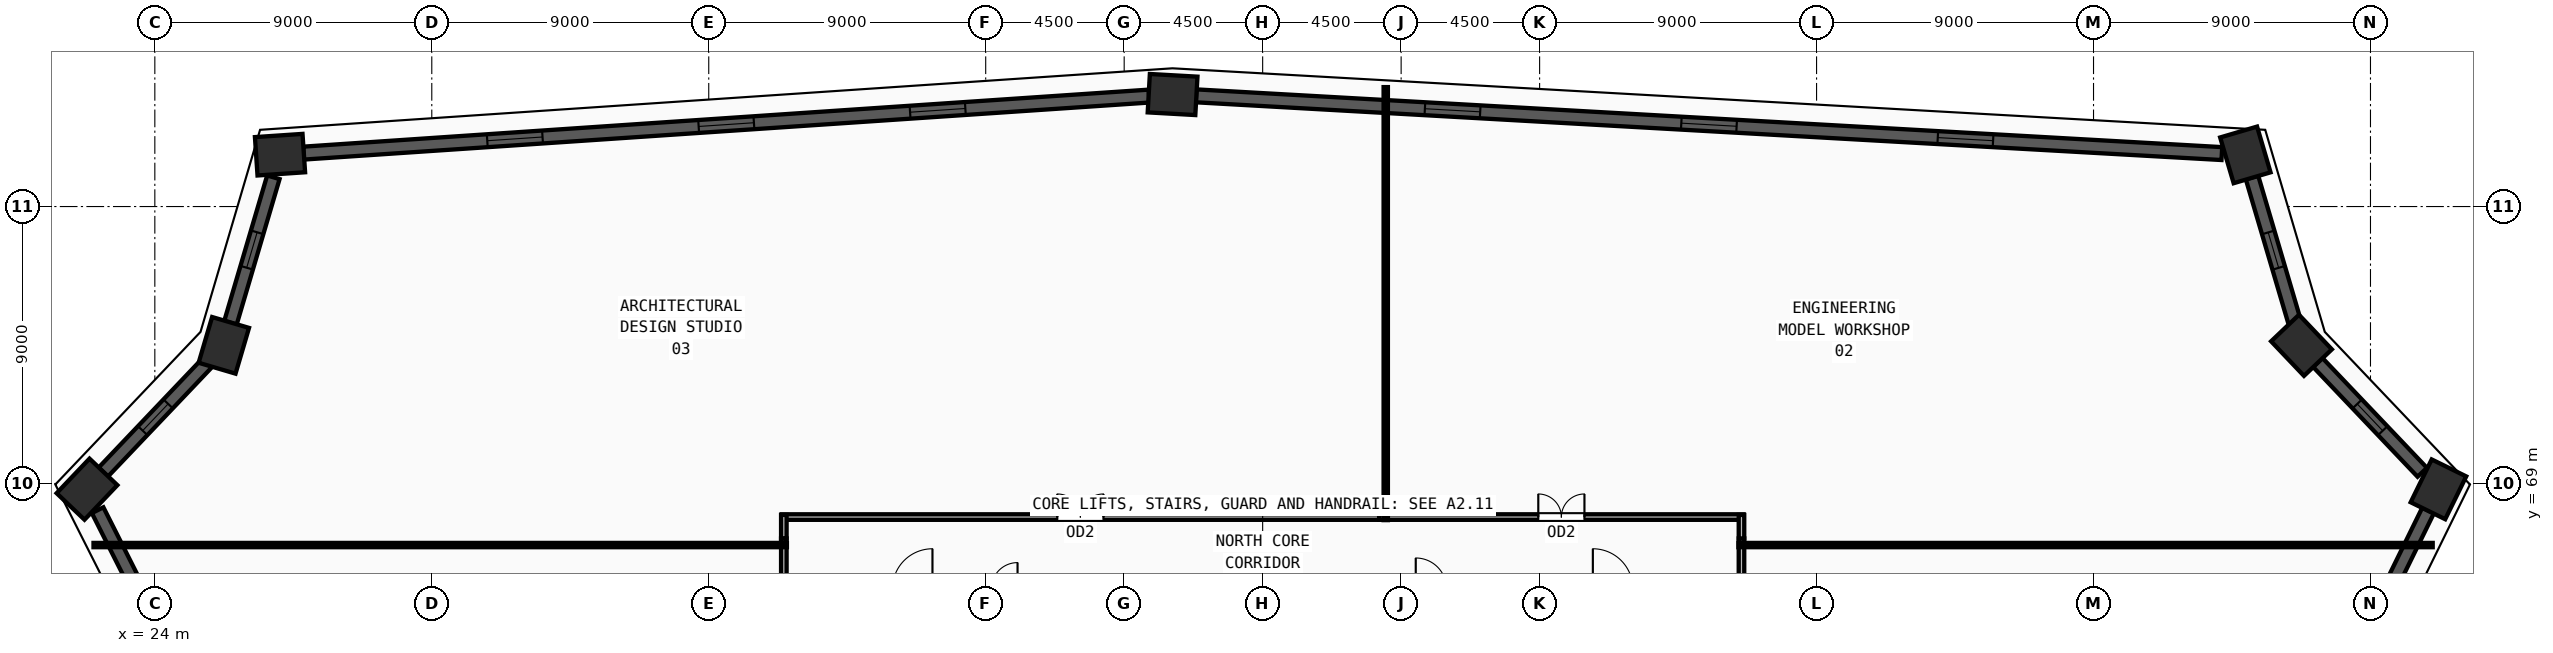
"""IFC4 building model, lengths in metres.
Left out: names, types, materials, properties, quantities, classifications, styles, units other than length and angle.
Written with IfcOpenShell. Run it as: python <this file> out.ifc"""

import sys

from ifc_helpers import new_model, si_unit, direction, frame, frame_2d, origin, origin_2d, place, context, subcontext, project, spatial, rectangle, extrude, source, transform, mapped, element, fill, save


model = new_model("IFC4")
c1 = context("Model", 3, precision=1e-05, world=origin(), true_north=direction((0.0, 1.0)))
c2 = subcontext(c1, "Body", "Model", "MODEL_VIEW")
j1 = project(units=[si_unit("LENGTHUNIT", "METRE"), si_unit("PLANEANGLEUNIT", "RADIAN")], contexts=[c1])
p1 = place(None, origin())
s1 = spatial("IfcSite", under=j1, at=p1, CompositionType="ELEMENT")
p2 = place(p1, origin())
s2 = spatial("IfcBuilding", under=s1, at=p2, CompositionType="ELEMENT")
p3 = place(p2, frame((0.0, 0.0, 63.0)))
s3 = spatial("IfcBuildingStorey", under=s2, at=p3, CompositionType="ELEMENT", Elevation=63.0)
m1 = source(origin(), c2, "Body", "SweptSolid", [
    extrude(rectangle(XDim=1.55, YDim=1.25, at=origin_2d()), origin(), (0.0, 0.0, 1.0), 3.75),
])
for number, where, z_axis, x_axis in (
    (1, (21.796, 68.816, 0.0), (0.0, 0.0, 1.0), (0.689, 0.725, 0.0)),
    (2, (26.242, 73.49, 0.0), (0.0, 0.0, 1.0), (0.283, 0.959, 0.0)),
    (3, (28.068, 79.685, 0.0), (0.0, 0.0, 1.0), (0.998, 0.067, 0.0)),
    (4, (57.073, 81.64, 0.0), (0.0, 0.0, 1.0), (-0.998, 0.056, 0.0)),
    (5, (91.934, 79.678, 0.0), (0.0, 0.0, 1.0), (-0.283, 0.959, 0.0)),
    (6, (93.758, 73.49, 0.0), (0.0, 0.0, 1.0), (-0.689, 0.725, 0.0)),
    (7, (98.209, 68.811, 0.0), (0.0, 0.0, 1.0), (0.441, 0.898, 0.0)),
):
    element("IfcColumn", number, at=place(p3, frame(where, z_axis=z_axis, x_axis=x_axis)), inside=s3, PredefinedType="COLUMN", context=c2, shape_type="MappedRepresentation", body=[
        mapped(m1, transform((0.0, 0.0, 0.0), x_axis=(1.0, 0.0, 0.0), y_axis=(0.0, 1.0, 0.0), z_axis=(0.0, 0.0, 1.0), scale=1.0)),
    ])
p4 = place(p3, frame((85.738, 43.403, 0.0), z_axis=(0.0, 0.0, 1.0), x_axis=(0.440623312768, 0.897692094343, 0.0)))
e8 = element("IfcWall", 8, at=p4, inside=s3, PredefinedType="SOLIDWALL", context=c2, shape_type="SweptSolid", body=[
    extrude(rectangle(XDim=27.538, YDim=0.42, at=frame_2d((13.769, 0.0))), origin(), (0.0, 0.0, 1.0), 3.57),
])
m2 = source(origin(), c2, "Body", "SweptSolid", [
    extrude(rectangle(XDim=1.8, YDim=1.95, at=frame_2d((0.9, 0.975))), frame((0.0, 0.22, 0.0), z_axis=(0.0, -1.0, 0.0), x_axis=(1.0, 0.0, 0.0)), (0.0, 0.0, 1.0), 0.44),
])
p5 = place(p4, frame((5.985, 0.0, 0.55)))
e9 = element("IfcOpeningElement", 9, at=p5, cuts=e8, PredefinedType="OPENING", context=c2, shape_type="MappedRepresentation", body=[
    mapped(m2, transform((0.0, 0.0, 0.0), x_axis=(1.0, 0.0, 0.0), y_axis=(0.0, 1.0, 0.0), z_axis=(0.0, 0.0, 1.0), scale=1.0)),
])
p6 = place(p4, frame((12.869, 0.0, 0.55)))
e10 = element("IfcOpeningElement", 10, at=p6, cuts=e8, PredefinedType="OPENING", context=c2, shape_type="MappedRepresentation", body=[
    mapped(m2, transform((0.0, 0.0, 0.0), x_axis=(1.0, 0.0, 0.0), y_axis=(0.0, 1.0, 0.0), z_axis=(0.0, 0.0, 1.0), scale=1.0)),
])
p7 = place(p4, frame((19.754, 0.0, 0.55)))
e11 = element("IfcOpeningElement", 11, at=p7, cuts=e8, PredefinedType="OPENING", context=c2, shape_type="MappedRepresentation", body=[
    mapped(m2, transform((0.0, 0.0, 0.0), x_axis=(1.0, 0.0, 0.0), y_axis=(0.0, 1.0, 0.0), z_axis=(0.0, 0.0, 1.0), scale=1.0)),
])
p8 = place(p3, frame((97.682, 69.365, 0.0), z_axis=(0.0, 0.0, 1.0), x_axis=(-0.689227085511, 0.724545391675, 0.0)))
e12 = element("IfcWall", 12, at=p8, inside=s3, PredefinedType="SOLIDWALL", context=c2, shape_type="SweptSolid", body=[
    extrude(rectangle(XDim=4.929, YDim=0.42, at=frame_2d((2.464, 0.0))), origin(), (0.0, 0.0, 1.0), 3.57),
])
m3 = source(origin(), c2, "Body", "SweptSolid", [
    extrude(rectangle(XDim=1.2, YDim=1.9, at=frame_2d((0.6, 0.95))), frame((0.0, 0.22, 0.0), z_axis=(0.0, -1.0, 0.0), x_axis=(1.0, 0.0, 0.0)), (0.0, 0.0, 1.0), 0.44),
])
p9 = place(p8, frame((1.864, 0.0, 0.55)))
e13 = element("IfcOpeningElement", 13, at=p9, cuts=e12, PredefinedType="OPENING", context=c2, shape_type="MappedRepresentation", body=[
    mapped(m3, transform((0.0, 0.0, 0.0), x_axis=(1.0, 0.0, 0.0), y_axis=(0.0, 1.0, 0.0), z_axis=(0.0, 0.0, 1.0), scale=1.0)),
])
p10 = place(p3, frame((93.542, 74.224, 0.0), z_axis=(0.0, 0.0, 1.0), x_axis=(-0.282888780921, 0.959152718616, 0.0)))
e14 = element("IfcWall", 14, at=p10, inside=s3, PredefinedType="SOLIDWALL", context=c2, shape_type="SweptSolid", body=[
    extrude(rectangle(XDim=4.921, YDim=0.42, at=frame_2d((2.46, 0.0))), origin(), (0.0, 0.0, 1.0), 3.57),
])
p11 = place(p10, frame((1.86, 0.0, 0.55)))
e15 = element("IfcOpeningElement", 15, at=p11, cuts=e14, PredefinedType="OPENING", context=c2, shape_type="MappedRepresentation", body=[
    mapped(m3, transform((0.0, 0.0, 0.0), x_axis=(1.0, 0.0, 0.0), y_axis=(0.0, 1.0, 0.0), z_axis=(0.0, 0.0, 1.0), scale=1.0)),
])
p12 = place(p3, frame((91.17, 79.721, 0.0), z_axis=(0.0, 0.0, 1.0), x_axis=(-0.998420041746, 0.056190926675, 0.0)))
e16 = element("IfcWall", 16, at=p12, inside=s3, PredefinedType="SOLIDWALL", context=c2, shape_type="SweptSolid", body=[
    extrude(rectangle(XDim=33.386, YDim=0.42, at=frame_2d((16.693, 0.0))), origin(), (0.0, 0.0, 1.0), 3.57),
])
p13 = place(p12, frame((7.446, 0.0, 0.55)))
e17 = element("IfcOpeningElement", 17, at=p13, cuts=e16, PredefinedType="OPENING", context=c2, shape_type="MappedRepresentation", body=[
    mapped(m2, transform((0.0, 0.0, 0.0), x_axis=(1.0, 0.0, 0.0), y_axis=(0.0, 1.0, 0.0), z_axis=(0.0, 0.0, 1.0), scale=1.0)),
])
p14 = place(p12, frame((15.793, 0.0, 0.55)))
e18 = element("IfcOpeningElement", 18, at=p14, cuts=e16, PredefinedType="OPENING", context=c2, shape_type="MappedRepresentation", body=[
    mapped(m2, transform((0.0, 0.0, 0.0), x_axis=(1.0, 0.0, 0.0), y_axis=(0.0, 1.0, 0.0), z_axis=(0.0, 0.0, 1.0), scale=1.0)),
])
p15 = place(p12, frame((24.139, 0.0, 0.55)))
e19 = element("IfcOpeningElement", 19, at=p15, cuts=e16, PredefinedType="OPENING", context=c2, shape_type="MappedRepresentation", body=[
    mapped(m2, transform((0.0, 0.0, 0.0), x_axis=(1.0, 0.0, 0.0), y_axis=(0.0, 1.0, 0.0), z_axis=(0.0, 0.0, 1.0), scale=1.0)),
])
p16 = place(p3, frame((56.31, 81.589, 0.0), z_axis=(0.0, 0.0, 1.0), x_axis=(-0.997734032959, -0.067281494306, 0.0)))
e20 = element("IfcWall", 20, at=p16, inside=s3, PredefinedType="SOLIDWALL", context=c2, shape_type="SweptSolid", body=[
    extrude(rectangle(XDim=27.542, YDim=0.42, at=frame_2d((13.771, 0.0))), origin(), (0.0, 0.0, 1.0), 3.57),
])
p17 = place(p16, frame((5.985, 0.0, 0.55)))
e21 = element("IfcOpeningElement", 21, at=p17, cuts=e20, PredefinedType="OPENING", context=c2, shape_type="MappedRepresentation", body=[
    mapped(m2, transform((0.0, 0.0, 0.0), x_axis=(1.0, 0.0, 0.0), y_axis=(0.0, 1.0, 0.0), z_axis=(0.0, 0.0, 1.0), scale=1.0)),
])
p18 = place(p16, frame((12.871, 0.0, 0.55)))
e22 = element("IfcOpeningElement", 22, at=p18, cuts=e20, PredefinedType="OPENING", context=c2, shape_type="MappedRepresentation", body=[
    mapped(m2, transform((0.0, 0.0, 0.0), x_axis=(1.0, 0.0, 0.0), y_axis=(0.0, 1.0, 0.0), z_axis=(0.0, 0.0, 1.0), scale=1.0)),
])
p19 = place(p16, frame((19.756, 0.0, 0.55)))
e23 = element("IfcOpeningElement", 23, at=p19, cuts=e20, PredefinedType="OPENING", context=c2, shape_type="MappedRepresentation", body=[
    mapped(m2, transform((0.0, 0.0, 0.0), x_axis=(1.0, 0.0, 0.0), y_axis=(0.0, 1.0, 0.0), z_axis=(0.0, 0.0, 1.0), scale=1.0)),
])
p20 = place(p3, frame((27.852, 78.951, 0.0), z_axis=(0.0, 0.0, 1.0), x_axis=(-0.282877012636, -0.95915618943, 0.0)))
e24 = element("IfcWall", 24, at=p20, inside=s3, PredefinedType="SOLIDWALL", context=c2, shape_type="SweptSolid", body=[
    extrude(rectangle(XDim=4.928, YDim=0.42, at=frame_2d((2.464, 0.0))), origin(), (0.0, 0.0, 1.0), 3.57),
])
p21 = place(p20, frame((1.864, 0.0, 0.55)))
e25 = element("IfcOpeningElement", 25, at=p21, cuts=e24, PredefinedType="OPENING", context=c2, shape_type="MappedRepresentation", body=[
    mapped(m3, transform((0.0, 0.0, 0.0), x_axis=(1.0, 0.0, 0.0), y_axis=(0.0, 1.0, 0.0), z_axis=(0.0, 0.0, 1.0), scale=1.0)),
])
p22 = place(p3, frame((25.715, 72.936, 0.0), z_axis=(0.0, 0.0, 1.0), x_axis=(-0.689226469502, -0.724545977656, 0.0)))
e26 = element("IfcWall", 26, at=p22, inside=s3, PredefinedType="SOLIDWALL", context=c2, shape_type="SweptSolid", body=[
    extrude(rectangle(XDim=4.922, YDim=0.42, at=frame_2d((2.461, 0.0))), origin(), (0.0, 0.0, 1.0), 3.57),
])
p23 = place(p22, frame((1.861, 0.0, 0.55)))
e27 = element("IfcOpeningElement", 27, at=p23, cuts=e26, PredefinedType="OPENING", context=c2, shape_type="MappedRepresentation", body=[
    mapped(m3, transform((0.0, 0.0, 0.0), x_axis=(1.0, 0.0, 0.0), y_axis=(0.0, 1.0, 0.0), z_axis=(0.0, 0.0, 1.0), scale=1.0)),
])
p24 = place(p3, frame((22.141, 68.133, 0.0), z_axis=(0.0, 0.0, 1.0), x_axis=(0.450521782218, -0.892765436017, 0.0)))
e28 = element("IfcWall", 28, at=p24, inside=s3, PredefinedType="SOLIDWALL", context=c2, shape_type="SweptSolid", body=[
    extrude(rectangle(XDim=33.385, YDim=0.42, at=frame_2d((16.693, 0.0))), origin(), (0.0, 0.0, 1.0), 3.57),
])
p25 = place(p24, frame((7.446, 0.0, 0.55)))
e29 = element("IfcOpeningElement", 29, at=p25, cuts=e28, PredefinedType="OPENING", context=c2, shape_type="MappedRepresentation", body=[
    mapped(m2, transform((0.0, 0.0, 0.0), x_axis=(1.0, 0.0, 0.0), y_axis=(0.0, 1.0, 0.0), z_axis=(0.0, 0.0, 1.0), scale=1.0)),
])
p26 = place(p24, frame((16.643, 0.0, 0.55)))
e30 = element("IfcOpeningElement", 30, at=p26, cuts=e28, PredefinedType="OPENING", context=c2, shape_type="MappedRepresentation", body=[
    mapped(m2, transform((0.0, 0.0, 0.0), x_axis=(1.0, 0.0, 0.0), y_axis=(0.0, 1.0, 0.0), z_axis=(0.0, 0.0, 1.0), scale=1.0)),
])
p27 = place(p24, frame((23.289, 0.0, 0.55)))
e31 = element("IfcOpeningElement", 31, at=p27, cuts=e28, PredefinedType="OPENING", context=c2, shape_type="MappedRepresentation", body=[
    mapped(m2, transform((0.0, 0.0, 0.0), x_axis=(1.0, 0.0, 0.0), y_axis=(0.0, 1.0, 0.0), z_axis=(0.0, 0.0, 1.0), scale=1.0)),
])
p28 = place(p3, frame((63.785, 67.91, 0.0), z_axis=(0.0, 0.0, 1.0), x_axis=(1.0, 0.0, 0.0)))
e32 = element("IfcWall", 32, at=p28, inside=s3, PredefinedType="PARTITIONING", context=c2, shape_type="SweptSolid", body=[
    extrude(rectangle(XDim=11.845, YDim=0.18, at=frame_2d((5.922, 0.0))), origin(), (0.0, 0.0, 1.0), 3.57),
])
m4 = source(origin(), c2, "Body", "SweptSolid", [
    extrude(rectangle(XDim=1.5, YDim=2.2, at=frame_2d((0.75, 1.1))), frame((0.0, 0.1, 0.0), z_axis=(0.0, -1.0, 0.0), x_axis=(1.0, 0.0, 0.0)), (0.0, 0.0, 1.0), 0.2),
])
p29 = place(p28, frame((5.172, 0.0, 0.0)))
e33 = element("IfcOpeningElement", 33, at=p29, cuts=e32, PredefinedType="OPENING", context=c2, shape_type="MappedRepresentation", body=[
    mapped(m4, transform((0.0, 0.0, 0.0), x_axis=(1.0, 0.0, 0.0), y_axis=(0.0, 1.0, 0.0), z_axis=(0.0, 0.0, 1.0), scale=1.0)),
])
p30 = place(p3, frame((44.37, 67.91, 0.0), z_axis=(0.0, 0.0, 1.0), x_axis=(1.0, 0.0, 0.0)))
e34 = element("IfcWall", 34, at=p30, inside=s3, PredefinedType="PARTITIONING", context=c2, shape_type="SweptSolid", body=[
    extrude(rectangle(XDim=19.415, YDim=0.18, at=frame_2d((9.708, 0.0))), origin(), (0.0, 0.0, 1.0), 3.57),
])
p31 = place(p30, frame((8.957, 0.0, 0.0)))
e35 = element("IfcOpeningElement", 35, at=p31, cuts=e34, PredefinedType="OPENING", context=c2, shape_type="MappedRepresentation", body=[
    mapped(m4, transform((0.0, 0.0, 0.0), x_axis=(1.0, 0.0, 0.0), y_axis=(0.0, 1.0, 0.0), z_axis=(0.0, 0.0, 1.0), scale=1.0)),
])
p32 = place(p3, frame((44.44, 54.285, 0.0), z_axis=(0.0, 0.0, 1.0), x_axis=(0.0, 1.0, 0.0)))
e36 = element("IfcWall", 36, at=p32, inside=s3, PredefinedType="PARTITIONING", context=c2, shape_type="SweptSolid", body=[
    extrude(rectangle(XDim=12.93, YDim=0.18, at=frame_2d((6.465, 0.0))), origin(), (0.0, 0.0, 1.0), 3.57),
])
p33 = place(p32, frame((5.715, 0.0, 0.0)))
e37 = element("IfcOpeningElement", 37, at=p33, cuts=e36, PredefinedType="OPENING", context=c2, shape_type="MappedRepresentation", body=[
    mapped(m4, transform((0.0, 0.0, 0.0), x_axis=(1.0, 0.0, 0.0), y_axis=(0.0, 1.0, 0.0), z_axis=(0.0, 0.0, 1.0), scale=1.0)),
])
p34 = place(p3, frame((75.56, 67.215, 0.0), z_axis=(0.0, 0.0, 1.0), x_axis=(0.0, -1.0, 0.0)))
e38 = element("IfcWall", 38, at=p34, inside=s3, PredefinedType="PARTITIONING", context=c2, shape_type="SweptSolid", body=[
    extrude(rectangle(XDim=2.235, YDim=0.18, at=frame_2d((1.118, 0.0))), origin(), (0.0, 0.0, 1.0), 3.57),
])
for number, where, z_axis, x_axis in (
    (39, (75.56, 67.98, 0.0), (0.0, 0.0, 1.0), (0.0, -1.0, 0.0)),
    (40, (44.44, 67.215, 0.0), (0.0, 0.0, 1.0), (0.0, 1.0, 0.0)),
):
    element("IfcWall", number, at=place(p3, frame(where, z_axis=z_axis, x_axis=x_axis)), inside=s3, PredefinedType="PARTITIONING", context=c2, shape_type="SweptSolid", body=[
        extrude(rectangle(XDim=0.765, YDim=0.18, at=frame_2d((0.382, 0.0))), origin(), (0.0, 0.0, 1.0), 3.57),
    ])
p35 = place(p3, frame((44.54, 67.0, 0.0), z_axis=(0.0, 0.0, 1.0), x_axis=(-1.0, 0.0, 0.0)))
e41 = element("IfcWall", 41, at=p35, inside=s3, PredefinedType="PARTITIONING", context=c2, shape_type="SweptSolid", body=[
    extrude(rectangle(XDim=22.533, YDim=0.14, at=frame_2d((11.267, 0.0))), origin(), (0.0, 0.0, 1.0), 2.655),
])
p36 = place(p3, frame((75.46, 67.0, 0.0), z_axis=(0.0, 0.0, 1.0), x_axis=(1.0, 0.0, 0.0)))
e42 = element("IfcWall", 42, at=p36, inside=s3, PredefinedType="PARTITIONING", context=c2, shape_type="SweptSolid", body=[
    extrude(rectangle(XDim=22.562, YDim=0.14, at=frame_2d((11.281, 0.0))), origin(), (0.0, 0.0, 1.0), 2.655),
])
p37 = place(p3, frame((64.0, 67.81, 0.0), z_axis=(0.0, 0.0, 1.0), x_axis=(0.0, 1.0, 0.0)))
e43 = element("IfcWall", 43, at=p37, inside=s3, PredefinedType="PARTITIONING", context=c2, shape_type="SweptSolid", body=[
    extrude(rectangle(XDim=14.071, YDim=0.14, at=frame_2d((7.036, 0.0))), origin(), (0.0, 0.0, 1.0), 3.57),
])
m5 = source(origin(), c2, "Body", "SweptSolid", [
    extrude(rectangle(XDim=1.2, YDim=1.9, at=frame_2d((0.6, 0.95))), frame((0.0, 0.03, 0.0), z_axis=(0.0, -1.0, 0.0), x_axis=(1.0, 0.0, 0.0)), (0.0, 0.0, 1.0), 0.06),
])
p38 = place(p9, origin())
e44 = element("IfcWindow", 44, at=p38, inside=s3, PartitioningType="SINGLE_PANEL", PredefinedType="WINDOW", context=c2, shape_type="MappedRepresentation", body=[
    mapped(m5, transform((0.0, 0.0, 0.0), x_axis=(1.0, 0.0, 0.0), y_axis=(0.0, 1.0, 0.0), z_axis=(0.0, 0.0, 1.0), scale=1.0)),
])
fill(e13, e44)
p39 = place(p11, origin())
e45 = element("IfcWindow", 45, at=p39, inside=s3, PartitioningType="SINGLE_PANEL", PredefinedType="WINDOW", context=c2, shape_type="MappedRepresentation", body=[
    mapped(m5, transform((0.0, 0.0, 0.0), x_axis=(1.0, 0.0, 0.0), y_axis=(0.0, 1.0, 0.0), z_axis=(0.0, 0.0, 1.0), scale=1.0)),
])
fill(e15, e45)
m6 = source(origin(), c2, "Body", "SweptSolid", [
    extrude(rectangle(XDim=1.8, YDim=1.95, at=frame_2d((0.9, 0.975))), frame((0.0, 0.03, 0.0), z_axis=(0.0, -1.0, 0.0), x_axis=(1.0, 0.0, 0.0)), (0.0, 0.0, 1.0), 0.06),
])
p40 = place(p13, origin())
e46 = element("IfcWindow", 46, at=p40, inside=s3, PartitioningType="DOUBLE_PANEL_VERTICAL", PredefinedType="WINDOW", context=c2, shape_type="MappedRepresentation", body=[
    mapped(m6, transform((0.0, 0.0, 0.0), x_axis=(1.0, 0.0, 0.0), y_axis=(0.0, 1.0, 0.0), z_axis=(0.0, 0.0, 1.0), scale=1.0)),
])
fill(e17, e46)
p41 = place(p14, origin())
e47 = element("IfcWindow", 47, at=p41, inside=s3, PartitioningType="DOUBLE_PANEL_VERTICAL", PredefinedType="WINDOW", context=c2, shape_type="MappedRepresentation", body=[
    mapped(m6, transform((0.0, 0.0, 0.0), x_axis=(1.0, 0.0, 0.0), y_axis=(0.0, 1.0, 0.0), z_axis=(0.0, 0.0, 1.0), scale=1.0)),
])
fill(e18, e47)
p42 = place(p15, origin())
e48 = element("IfcWindow", 48, at=p42, inside=s3, PartitioningType="DOUBLE_PANEL_VERTICAL", PredefinedType="WINDOW", context=c2, shape_type="MappedRepresentation", body=[
    mapped(m6, transform((0.0, 0.0, 0.0), x_axis=(1.0, 0.0, 0.0), y_axis=(0.0, 1.0, 0.0), z_axis=(0.0, 0.0, 1.0), scale=1.0)),
])
fill(e19, e48)
p43 = place(p17, origin())
e49 = element("IfcWindow", 49, at=p43, inside=s3, PartitioningType="DOUBLE_PANEL_VERTICAL", PredefinedType="WINDOW", context=c2, shape_type="MappedRepresentation", body=[
    mapped(m6, transform((0.0, 0.0, 0.0), x_axis=(1.0, 0.0, 0.0), y_axis=(0.0, 1.0, 0.0), z_axis=(0.0, 0.0, 1.0), scale=1.0)),
])
fill(e21, e49)
p44 = place(p18, origin())
e50 = element("IfcWindow", 50, at=p44, inside=s3, PartitioningType="DOUBLE_PANEL_VERTICAL", PredefinedType="WINDOW", context=c2, shape_type="MappedRepresentation", body=[
    mapped(m6, transform((0.0, 0.0, 0.0), x_axis=(1.0, 0.0, 0.0), y_axis=(0.0, 1.0, 0.0), z_axis=(0.0, 0.0, 1.0), scale=1.0)),
])
fill(e22, e50)
p45 = place(p19, origin())
e51 = element("IfcWindow", 51, at=p45, inside=s3, PartitioningType="DOUBLE_PANEL_VERTICAL", PredefinedType="WINDOW", context=c2, shape_type="MappedRepresentation", body=[
    mapped(m6, transform((0.0, 0.0, 0.0), x_axis=(1.0, 0.0, 0.0), y_axis=(0.0, 1.0, 0.0), z_axis=(0.0, 0.0, 1.0), scale=1.0)),
])
fill(e23, e51)
p46 = place(p21, origin())
e52 = element("IfcWindow", 52, at=p46, inside=s3, PartitioningType="SINGLE_PANEL", PredefinedType="WINDOW", context=c2, shape_type="MappedRepresentation", body=[
    mapped(m5, transform((0.0, 0.0, 0.0), x_axis=(1.0, 0.0, 0.0), y_axis=(0.0, 1.0, 0.0), z_axis=(0.0, 0.0, 1.0), scale=1.0)),
])
fill(e25, e52)
p47 = place(p23, origin())
e53 = element("IfcWindow", 53, at=p47, inside=s3, PartitioningType="SINGLE_PANEL", PredefinedType="WINDOW", context=c2, shape_type="MappedRepresentation", body=[
    mapped(m5, transform((0.0, 0.0, 0.0), x_axis=(1.0, 0.0, 0.0), y_axis=(0.0, 1.0, 0.0), z_axis=(0.0, 0.0, 1.0), scale=1.0)),
])
fill(e27, e53)
m7 = source(origin(), c2, "Body", "SweptSolid", [
    extrude(rectangle(XDim=1.5, YDim=2.2, at=frame_2d((0.75, 1.1))), frame((0.0, 0.025, 0.0), z_axis=(0.0, -1.0, 0.0), x_axis=(1.0, 0.0, 0.0)), (0.0, 0.0, 1.0), 0.05),
])
p48 = place(p29, origin())
e54 = element("IfcDoor", 54, at=p48, inside=s3, OperationType="DOUBLE_DOOR_SINGLE_SWING", PredefinedType="DOOR", context=c2, shape_type="MappedRepresentation", body=[
    mapped(m7, transform((0.0, 0.0, 0.0), x_axis=(1.0, 0.0, 0.0), y_axis=(0.0, 1.0, 0.0), z_axis=(0.0, 0.0, 1.0), scale=1.0)),
])
fill(e33, e54)
p49 = place(p31, origin())
e55 = element("IfcDoor", 55, at=p49, inside=s3, OperationType="DOUBLE_DOOR_SINGLE_SWING", PredefinedType="DOOR", context=c2, shape_type="MappedRepresentation", body=[
    mapped(m7, transform((0.0, 0.0, 0.0), x_axis=(1.0, 0.0, 0.0), y_axis=(0.0, 1.0, 0.0), z_axis=(0.0, 0.0, 1.0), scale=1.0)),
])
fill(e35, e55)
save(model, sys.argv[1])
